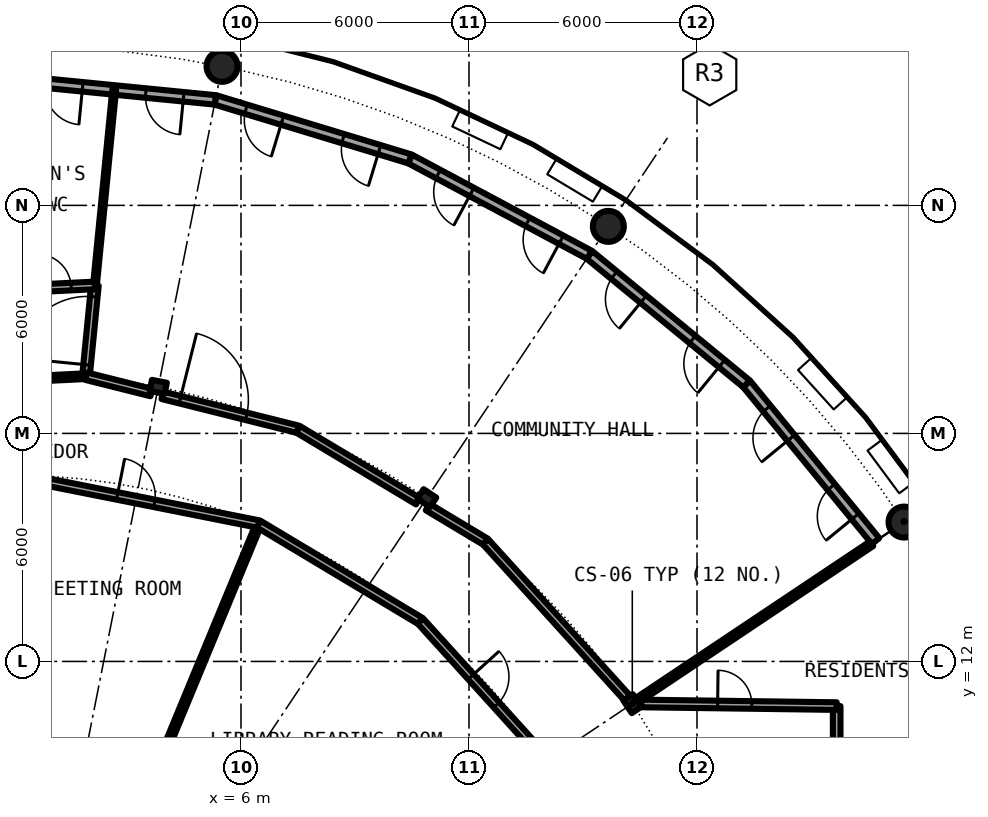
"""IFC4 building model, lengths in metres.
Left out: names, types, materials, properties, quantities, classifications, styles, units other than length and angle.
Written with IfcOpenShell. Run it as: python <this file> out.ifc"""

import sys

from ifc_helpers import new_model, si_unit, direction, frame, frame_2d, origin, origin_2d, place, context, subcontext, project, spatial, rectangle, hollow_circle, i_section, extrude, element, fill, save


model = new_model("IFC4")
c1 = context("Model", 3, precision=1e-05, world=origin(), true_north=direction((0.0, 1.0)))
c2 = subcontext(c1, "Body", "Model", "MODEL_VIEW")
j1 = project(units=[si_unit("LENGTHUNIT", "METRE"), si_unit("PLANEANGLEUNIT", "RADIAN")], contexts=[c1])
p1 = place(None, origin())
s1 = spatial("IfcSite", under=j1, at=p1, CompositionType="ELEMENT")
p2 = place(p1, origin())
s2 = spatial("IfcBuilding", under=s1, at=p2, CompositionType="ELEMENT")
p3 = place(p2, frame((0.0, 0.0, 208.5)))
s3 = spatial("IfcBuildingStorey", under=s2, at=p3, CompositionType="ELEMENT", Elevation=208.5)
for number, where, z_axis, x_axis in (
    (1, (23.448, 15.667, 0.0), (0.0, 0.0, 1.0), (1.0, 0.0, 0.0)),
    (2, (15.667, 23.448, 0.0), (0.0, 0.0, 1.0), (1.0, 0.0, 0.0)),
    (3, (5.501, 27.658, 0.0), (0.0, 0.0, 1.0), (1.0, 0.0, 0.0)),
):
    element("IfcColumn", number, at=place(p3, frame(where, z_axis=z_axis, x_axis=x_axis)), inside=s3, PredefinedType="COLUMN", context=c2, shape_type="SweptSolid", body=[
        extrude(hollow_circle(Radius=0.406, WallThickness=0.03, at=origin_2d()), origin(), (0.0, 0.0, 1.0), 4.2),
    ])
for number, where, z_axis, x_axis in (
    (4, (16.297, 10.889, 0.0), (0.0, 0.0, 1.0), (0.831, 0.556, 0.0)),
    (5, (10.889, 16.297, 0.0), (0.0, 0.0, 1.0), (0.556, 0.831, 0.0)),
    (6, (3.824, 19.223, 0.0), (0.0, 0.0, 1.0), (0.195, 0.981, 0.0)),
):
    element("IfcColumn", number, at=place(p3, frame(where, z_axis=z_axis, x_axis=x_axis)), inside=s3, PredefinedType="COLUMN", context=c2, shape_type="SweptSolid", body=[
        extrude(i_section(OverallWidth=0.3, OverallDepth=0.4, WebThickness=0.013, FlangeThickness=0.024, FilletRadius=0.027, at=origin_2d()), origin(), (0.0, 0.0, 1.0), 4.2),
    ])
p4 = place(p3, frame((22.699, 15.167, 0.0), z_axis=(0.0, 0.0, 1.0), x_axis=(-0.634382322723, 0.773019449054, 0.0)))
e7 = element("IfcWall", 7, at=p4, inside=s3, PredefinedType="SOLIDWALL", context=c2, shape_type="SweptSolid", body=[
    extrude(rectangle(XDim=5.352, YDim=0.25, at=frame_2d((2.676, 0.0))), origin(), (0.0, 0.0, 1.0), 3.85),
])
p5 = place(p4, frame((0.841, 0.0, 0.0)))
e8 = element("IfcOpeningElement", 8, at=p5, cuts=e7, PredefinedType="OPENING", context=c2, shape_type="SweptSolid", body=[
    extrude(rectangle(XDim=1.0, YDim=2.2, at=frame_2d((0.5, 1.1))), frame((0.0, 0.135, 0.0), z_axis=(0.0, -1.0, 0.0), x_axis=(1.0, 0.0, 0.0)), (0.0, 0.0, 1.0), 0.27),
])
p6 = place(p4, frame((3.51, 0.0, 0.0)))
e9 = element("IfcOpeningElement", 9, at=p6, cuts=e7, PredefinedType="OPENING", context=c2, shape_type="SweptSolid", body=[
    extrude(rectangle(XDim=1.0, YDim=2.2, at=frame_2d((0.5, 1.1))), frame((0.0, 0.135, 0.0), z_axis=(0.0, -1.0, 0.0), x_axis=(1.0, 0.0, 0.0)), (0.0, 0.0, 1.0), 0.27),
])
p7 = place(p3, frame((19.304, 19.304, 0.0), z_axis=(0.0, 0.0, 1.0), x_axis=(-0.773019449054, 0.634382322723, 0.0)))
e10 = element("IfcWall", 10, at=p7, inside=s3, PredefinedType="SOLIDWALL", context=c2, shape_type="SweptSolid", body=[
    extrude(rectangle(XDim=5.352, YDim=0.25, at=frame_2d((2.676, 0.0))), origin(), (0.0, 0.0, 1.0), 3.85),
])
p8 = place(p7, frame((0.841, 0.0, 0.0)))
e11 = element("IfcOpeningElement", 11, at=p8, cuts=e10, PredefinedType="OPENING", context=c2, shape_type="SweptSolid", body=[
    extrude(rectangle(XDim=1.0, YDim=2.2, at=frame_2d((0.5, 1.1))), frame((0.0, 0.135, 0.0), z_axis=(0.0, -1.0, 0.0), x_axis=(1.0, 0.0, 0.0)), (0.0, 0.0, 1.0), 0.27),
])
p9 = place(p7, frame((3.51, 0.0, 0.0)))
e12 = element("IfcOpeningElement", 12, at=p9, cuts=e10, PredefinedType="OPENING", context=c2, shape_type="SweptSolid", body=[
    extrude(rectangle(XDim=1.0, YDim=2.2, at=frame_2d((0.5, 1.1))), frame((0.0, 0.135, 0.0), z_axis=(0.0, -1.0, 0.0), x_axis=(1.0, 0.0, 0.0)), (0.0, 0.0, 1.0), 0.27),
])
p10 = place(p3, frame((15.167, 22.699, 0.0), z_axis=(0.0, 0.0, 1.0), x_axis=(-0.881915646801, 0.471407246368, 0.0)))
e13 = element("IfcWall", 13, at=p10, inside=s3, PredefinedType="SOLIDWALL", context=c2, shape_type="SweptSolid", body=[
    extrude(rectangle(XDim=5.352, YDim=0.25, at=frame_2d((2.676, 0.0))), origin(), (0.0, 0.0, 1.0), 3.85),
])
p11 = place(p10, frame((0.841, 0.0, 0.0)))
e14 = element("IfcOpeningElement", 14, at=p11, cuts=e13, PredefinedType="OPENING", context=c2, shape_type="SweptSolid", body=[
    extrude(rectangle(XDim=1.0, YDim=2.2, at=frame_2d((0.5, 1.1))), frame((0.0, 0.135, 0.0), z_axis=(0.0, -1.0, 0.0), x_axis=(1.0, 0.0, 0.0)), (0.0, 0.0, 1.0), 0.27),
])
p12 = place(p10, frame((3.51, 0.0, 0.0)))
e15 = element("IfcOpeningElement", 15, at=p12, cuts=e13, PredefinedType="OPENING", context=c2, shape_type="SweptSolid", body=[
    extrude(rectangle(XDim=1.0, YDim=2.2, at=frame_2d((0.5, 1.1))), frame((0.0, 0.135, 0.0), z_axis=(0.0, -1.0, 0.0), x_axis=(1.0, 0.0, 0.0)), (0.0, 0.0, 1.0), 0.27),
])
p13 = place(p3, frame((10.447, 25.222, 0.0), z_axis=(0.0, 0.0, 1.0), x_axis=(-0.956965678721, 0.290201119486, 0.0)))
e16 = element("IfcWall", 16, at=p13, inside=s3, PredefinedType="SOLIDWALL", context=c2, shape_type="SweptSolid", body=[
    extrude(rectangle(XDim=5.351, YDim=0.25, at=frame_2d((2.676, 0.0))), origin(), (0.0, 0.0, 1.0), 3.85),
])
p14 = place(p13, frame((0.841, 0.0, 0.0)))
e17 = element("IfcOpeningElement", 17, at=p14, cuts=e16, PredefinedType="OPENING", context=c2, shape_type="SweptSolid", body=[
    extrude(rectangle(XDim=1.0, YDim=2.2, at=frame_2d((0.5, 1.1))), frame((0.0, 0.135, 0.0), z_axis=(0.0, -1.0, 0.0), x_axis=(1.0, 0.0, 0.0)), (0.0, 0.0, 1.0), 0.27),
])
p15 = place(p13, frame((3.51, 0.0, 0.0)))
e18 = element("IfcOpeningElement", 18, at=p15, cuts=e16, PredefinedType="OPENING", context=c2, shape_type="SweptSolid", body=[
    extrude(rectangle(XDim=1.0, YDim=2.2, at=frame_2d((0.5, 1.1))), frame((0.0, 0.135, 0.0), z_axis=(0.0, -1.0, 0.0), x_axis=(1.0, 0.0, 0.0)), (0.0, 0.0, 1.0), 0.27),
])
p16 = place(p3, frame((5.326, 26.775, 0.0), z_axis=(0.0, 0.0, 1.0), x_axis=(-0.995173996315, 0.098126026407, 0.0)))
e19 = element("IfcWall", 19, at=p16, inside=s3, PredefinedType="SOLIDWALL", context=c2, shape_type="SweptSolid", body=[
    extrude(rectangle(XDim=5.352, YDim=0.25, at=frame_2d((2.676, 0.0))), origin(), (0.0, 0.0, 1.0), 3.85),
])
p17 = place(p16, frame((0.841, 0.0, 0.0)))
e20 = element("IfcOpeningElement", 20, at=p17, cuts=e19, PredefinedType="OPENING", context=c2, shape_type="SweptSolid", body=[
    extrude(rectangle(XDim=1.0, YDim=2.2, at=frame_2d((0.5, 1.1))), frame((0.0, 0.135, 0.0), z_axis=(0.0, -1.0, 0.0), x_axis=(1.0, 0.0, 0.0)), (0.0, 0.0, 1.0), 0.27),
])
p18 = place(p16, frame((3.51, 0.0, 0.0)))
e21 = element("IfcOpeningElement", 21, at=p18, cuts=e19, PredefinedType="OPENING", context=c2, shape_type="SweptSolid", body=[
    extrude(rectangle(XDim=1.0, YDim=2.2, at=frame_2d((0.5, 1.1))), frame((0.0, 0.135, 0.0), z_axis=(0.0, -1.0, 0.0), x_axis=(1.0, 0.0, 0.0)), (0.0, 0.0, 1.0), 0.27),
])
p19 = place(p3, frame((21.675, 9.05, 0.0), z_axis=(0.0, 0.0, 1.0), x_axis=(0.0, 1.0, 0.0)))
e22 = element("IfcWall", 22, at=p19, inside=s3, PredefinedType="PARTITIONING", context=c2, shape_type="SweptSolid", body=[
    extrude(rectangle(XDim=1.775, YDim=0.2, at=frame_2d((0.887, 0.0))), origin(), (0.0, 0.0, 1.0), 3.85),
])
p20 = place(p3, frame((1.921, 19.506, 0.0), z_axis=(0.0, 0.0, 1.0), x_axis=(0.097982433599, 0.995188144376, 0.0)))
e23 = element("IfcWall", 23, at=p20, inside=s3, PredefinedType="PARTITIONING", context=c2, shape_type="SweptSolid", body=[
    extrude(rectangle(XDim=2.399, YDim=0.2, at=frame_2d((1.2, 0.0))), origin(), (0.0, 0.0, 1.0), 3.85),
])
p21 = place(p20, frame((0.3, 0.0, 0.0)))
e24 = element("IfcOpeningElement", 24, at=p21, cuts=e23, PredefinedType="OPENING", context=c2, shape_type="SweptSolid", body=[
    extrude(rectangle(XDim=1.8, YDim=2.3, at=frame_2d((0.9, 1.15))), frame((0.0, 0.11, 0.0), z_axis=(0.0, -1.0, 0.0), x_axis=(1.0, 0.0, 0.0)), (0.0, 0.0, 1.0), 0.22),
])
p22 = place(p3, frame((2.156, 21.894, 0.0), z_axis=(0.0, 0.0, 1.0), x_axis=(0.098177046306, 0.995168964336, 0.0)))
e25 = element("IfcWall", 25, at=p22, inside=s3, PredefinedType="PARTITIONING", context=c2, shape_type="SweptSolid", body=[
    extrude(rectangle(XDim=5.175, YDim=0.1, at=frame_2d((2.587, 0.0))), origin(), (0.0, 0.0, 1.0), 3.85),
])
p23 = place(p3, frame((2.954, 7.132, 0.0), z_axis=(0.0, 0.0, 1.0), x_axis=(0.382646942224, 0.923894646378, 0.0)))
e26 = element("IfcWall", 26, at=p23, inside=s3, PredefinedType="PARTITIONING", context=c2, shape_type="SweptSolid", body=[
    extrude(rectangle(XDim=9.181, YDim=0.15, at=frame_2d((4.59, 0.0))), origin(), (0.0, 0.0, 1.0), 3.85),
])
p24 = place(p3, frame((16.463, 11.0, 0.0), z_axis=(0.0, 0.0, 1.0), x_axis=(0.831433566583, 0.555624175463, 0.0)))
e27 = element("IfcWall", 27, at=p24, inside=s3, PredefinedType="PARTITIONING", context=c2, shape_type="SweptSolid", body=[
    extrude(rectangle(XDim=7.375, YDim=0.15, at=frame_2d((3.688, 0.0))), origin(), (0.0, 0.0, 1.0), 3.85),
])
p25 = place(p3, frame((16.534, 10.894, 0.0), z_axis=(0.0, 0.0, 1.0), x_axis=(0.999909707888, -0.013437859594, 0.0)))
e28 = element("IfcWall", 28, at=p25, inside=s3, PredefinedType="PARTITIONING", context=c2, shape_type="SweptSolid", body=[
    extrude(rectangle(XDim=5.142, YDim=0.2, at=frame_2d((2.571, 0.0))), origin(), (0.0, 0.0, 1.0), 3.85),
])
p26 = place(p25, frame((2.008, 0.0, 0.0)))
e29 = element("IfcOpeningElement", 29, at=p26, cuts=e28, PredefinedType="OPENING", context=c2, shape_type="SweptSolid", body=[
    extrude(rectangle(XDim=0.9, YDim=2.3, at=frame_2d((0.45, 1.15))), frame((0.0, 0.11, 0.0), z_axis=(0.0, -1.0, 0.0), x_axis=(1.0, 0.0, 0.0)), (0.0, 0.0, 1.0), 0.22),
])
p27 = place(p3, frame((0.0, 16.9, 0.0), z_axis=(0.0, 0.0, 1.0), x_axis=(0.980799374359, -0.195019453537, 0.0)))
e30 = element("IfcWall", 30, at=p27, inside=s3, PredefinedType="PARTITIONING", context=c2, shape_type="SweptSolid", body=[
    extrude(rectangle(XDim=6.594, YDim=0.2, at=frame_2d((3.297, 0.0))), origin(), (0.0, 0.0, 1.0), 3.85),
])
p28 = place(p27, frame((2.797, 0.0, 0.0)))
e31 = element("IfcOpeningElement", 31, at=p28, cuts=e30, PredefinedType="OPENING", context=c2, shape_type="SweptSolid", body=[
    extrude(rectangle(XDim=1.0, YDim=2.3, at=frame_2d((0.5, 1.15))), frame((0.0, 0.11, 0.0), z_axis=(0.0, -1.0, 0.0), x_axis=(1.0, 0.0, 0.0)), (0.0, 0.0, 1.0), 0.22),
])
p29 = place(p3, frame((6.467, 15.614, 0.0), z_axis=(0.0, 0.0, 1.0), x_axis=(0.857696997328, -0.514155483074, 0.0)))
e32 = element("IfcWall", 32, at=p29, inside=s3, PredefinedType="PARTITIONING", context=c2, shape_type="SweptSolid", body=[
    extrude(rectangle(XDim=4.96, YDim=0.2, at=frame_2d((2.48, 0.0))), origin(), (0.0, 0.0, 1.0), 3.85),
])
p30 = place(p3, frame((10.721, 13.064, 0.0), z_axis=(0.0, 0.0, 1.0), x_axis=(0.671634030197, -0.740883074095, 0.0)))
e33 = element("IfcWall", 33, at=p30, inside=s3, PredefinedType="PARTITIONING", context=c2, shape_type="SweptSolid", body=[
    extrude(rectangle(XDim=5.08, YDim=0.2, at=frame_2d((2.54, 0.0))), origin(), (0.0, 0.0, 1.0), 3.85),
])
p31 = place(p30, frame((1.98, 0.0, 0.0)))
e34 = element("IfcOpeningElement", 34, at=p31, cuts=e33, PredefinedType="OPENING", context=c2, shape_type="SweptSolid", body=[
    extrude(rectangle(XDim=1.0, YDim=2.3, at=frame_2d((0.5, 1.15))), frame((0.0, 0.11, 0.0), z_axis=(0.0, -1.0, 0.0), x_axis=(1.0, 0.0, 0.0)), (0.0, 0.0, 1.0), 0.22),
])
p32 = place(p3, frame((-3.672, 19.23, 0.0), z_axis=(0.0, 0.0, 1.0), x_axis=(0.998783562084, 0.049309188909, 0.0)))
e35 = element("IfcWall", 35, at=p32, inside=s3, PredefinedType="PARTITIONING", context=c2, shape_type="SweptSolid", body=[
    extrude(rectangle(XDim=5.6, YDim=0.15, at=frame_2d((2.8, 0.0))), origin(), (0.0, 0.0, 1.0), 3.6),
])
p33 = place(p32, frame((2.224, 0.0, 0.0)))
e36 = element("IfcOpeningElement", 36, at=p33, cuts=e35, PredefinedType="OPENING", context=c2, shape_type="SweptSolid", body=[
    extrude(rectangle(XDim=1.0, YDim=2.3, at=frame_2d((0.5, 1.15))), frame((0.0, 0.085, 0.0), z_axis=(0.0, -1.0, 0.0), x_axis=(1.0, 0.0, 0.0)), (0.0, 0.0, 1.0), 0.17),
])
p34 = place(p3, frame((1.921, 19.506, 0.0), z_axis=(0.0, 0.0, 1.0), x_axis=(0.969996560647, -0.243118638391, 0.0)))
e37 = element("IfcWall", 37, at=p34, inside=s3, PredefinedType="PARTITIONING", context=c2, shape_type="SweptSolid", body=[
    extrude(rectangle(XDim=1.773, YDim=0.2, at=frame_2d((0.887, 0.0))), origin(), (0.0, 0.0, 1.0), 3.6),
])
p35 = place(p3, frame((3.933, 19.002, 0.0), z_axis=(0.0, 0.0, 1.0), x_axis=(0.970009604092, -0.243066591637, 0.0)))
e38 = element("IfcWall", 38, at=p35, inside=s3, PredefinedType="PARTITIONING", context=c2, shape_type="SweptSolid", body=[
    extrude(rectangle(XDim=3.678, YDim=0.2, at=frame_2d((1.839, 0.0))), origin(), (0.0, 0.0, 1.0), 3.6),
])
p36 = place(p35, frame((0.476, 0.0, 0.0)))
e39 = element("IfcOpeningElement", 39, at=p36, cuts=e38, PredefinedType="OPENING", context=c2, shape_type="SweptSolid", body=[
    extrude(rectangle(XDim=1.8, YDim=2.3, at=frame_2d((0.9, 1.15))), frame((0.0, 0.11, 0.0), z_axis=(0.0, -1.0, 0.0), x_axis=(1.0, 0.0, 0.0)), (0.0, 0.0, 1.0), 0.22),
])
p37 = place(p3, frame((7.501, 18.108, 0.0), z_axis=(0.0, 0.0, 1.0), x_axis=(0.857750505244, -0.514066212421, 0.0)))
e40 = element("IfcWall", 40, at=p37, inside=s3, PredefinedType="PARTITIONING", context=c2, shape_type="SweptSolid", body=[
    extrude(rectangle(XDim=3.678, YDim=0.2, at=frame_2d((1.839, 0.0))), origin(), (0.0, 0.0, 1.0), 3.6),
])
p38 = place(p3, frame((10.913, 16.063, 0.0), z_axis=(0.0, 0.0, 1.0), x_axis=(0.857614365469, -0.514293301668, 0.0)))
e41 = element("IfcWall", 41, at=p38, inside=s3, PredefinedType="PARTITIONING", context=c2, shape_type="SweptSolid", body=[
    extrude(rectangle(XDim=1.773, YDim=0.2, at=frame_2d((0.887, 0.0))), origin(), (0.0, 0.0, 1.0), 3.6),
])
p39 = place(p3, frame((12.434, 15.151, 0.0), z_axis=(0.0, 0.0, 1.0), x_axis=(0.671619657805, -0.740896102871, 0.0)))
e42 = element("IfcWall", 42, at=p39, inside=s3, PredefinedType="PARTITIONING", context=c2, shape_type="SweptSolid", body=[
    extrude(rectangle(XDim=5.6, YDim=0.2, at=frame_2d((2.8, 0.0))), origin(), (0.0, 0.0, 1.0), 3.6),
])
p40 = place(p3, frame((0.007, 21.788, 0.0), z_axis=(0.0, 0.0, 1.0), x_axis=(0.998786623078, 0.049247147741, 0.0)))
e43 = element("IfcWall", 43, at=p40, inside=s3, PredefinedType="PARTITIONING", context=c2, shape_type="SweptSolid", body=[
    extrude(rectangle(XDim=2.152, YDim=0.2, at=frame_2d((1.076, 0.0))), origin(), (0.0, 0.0, 1.0), 3.85),
])
p41 = place(p40, frame((0.626, 0.0, 0.0)))
e44 = element("IfcOpeningElement", 44, at=p41, cuts=e43, PredefinedType="OPENING", context=c2, shape_type="SweptSolid", body=[
    extrude(rectangle(XDim=0.9, YDim=2.3, at=frame_2d((0.45, 1.15))), frame((0.0, 0.11, 0.0), z_axis=(0.0, -1.0, 0.0), x_axis=(1.0, 0.0, 0.0)), (0.0, 0.0, 1.0), 0.22),
])
p42 = place(p5, origin())
e45 = element("IfcDoor", 45, at=p42, inside=s3, OperationType="SINGLE_SWING_LEFT", PredefinedType="DOOR", context=c2, shape_type="SweptSolid", body=[
    extrude(rectangle(XDim=1.0, YDim=2.2, at=frame_2d((0.5, 1.1))), frame((0.0, 0.025, 0.0), z_axis=(0.0, -1.0, 0.0), x_axis=(1.0, 0.0, 0.0)), (0.0, 0.0, 1.0), 0.05),
])
fill(e8, e45)
p43 = place(p6, origin())
e46 = element("IfcDoor", 46, at=p43, inside=s3, OperationType="SINGLE_SWING_LEFT", PredefinedType="DOOR", context=c2, shape_type="SweptSolid", body=[
    extrude(rectangle(XDim=1.0, YDim=2.2, at=frame_2d((0.5, 1.1))), frame((0.0, 0.025, 0.0), z_axis=(0.0, -1.0, 0.0), x_axis=(1.0, 0.0, 0.0)), (0.0, 0.0, 1.0), 0.05),
])
fill(e9, e46)
p44 = place(p8, origin())
e47 = element("IfcDoor", 47, at=p44, inside=s3, OperationType="SINGLE_SWING_LEFT", PredefinedType="DOOR", context=c2, shape_type="SweptSolid", body=[
    extrude(rectangle(XDim=1.0, YDim=2.2, at=frame_2d((0.5, 1.1))), frame((0.0, 0.025, 0.0), z_axis=(0.0, -1.0, 0.0), x_axis=(1.0, 0.0, 0.0)), (0.0, 0.0, 1.0), 0.05),
])
fill(e11, e47)
p45 = place(p9, origin())
e48 = element("IfcDoor", 48, at=p45, inside=s3, OperationType="SINGLE_SWING_LEFT", PredefinedType="DOOR", context=c2, shape_type="SweptSolid", body=[
    extrude(rectangle(XDim=1.0, YDim=2.2, at=frame_2d((0.5, 1.1))), frame((0.0, 0.025, 0.0), z_axis=(0.0, -1.0, 0.0), x_axis=(1.0, 0.0, 0.0)), (0.0, 0.0, 1.0), 0.05),
])
fill(e12, e48)
p46 = place(p11, origin())
e49 = element("IfcDoor", 49, at=p46, inside=s3, OperationType="SINGLE_SWING_LEFT", PredefinedType="DOOR", context=c2, shape_type="SweptSolid", body=[
    extrude(rectangle(XDim=1.0, YDim=2.2, at=frame_2d((0.5, 1.1))), frame((0.0, 0.025, 0.0), z_axis=(0.0, -1.0, 0.0), x_axis=(1.0, 0.0, 0.0)), (0.0, 0.0, 1.0), 0.05),
])
fill(e14, e49)
p47 = place(p12, origin())
e50 = element("IfcDoor", 50, at=p47, inside=s3, OperationType="SINGLE_SWING_LEFT", PredefinedType="DOOR", context=c2, shape_type="SweptSolid", body=[
    extrude(rectangle(XDim=1.0, YDim=2.2, at=frame_2d((0.5, 1.1))), frame((0.0, 0.025, 0.0), z_axis=(0.0, -1.0, 0.0), x_axis=(1.0, 0.0, 0.0)), (0.0, 0.0, 1.0), 0.05),
])
fill(e15, e50)
p48 = place(p14, origin())
e51 = element("IfcDoor", 51, at=p48, inside=s3, OperationType="SINGLE_SWING_LEFT", PredefinedType="DOOR", context=c2, shape_type="SweptSolid", body=[
    extrude(rectangle(XDim=1.0, YDim=2.2, at=frame_2d((0.5, 1.1))), frame((0.0, 0.025, 0.0), z_axis=(0.0, -1.0, 0.0), x_axis=(1.0, 0.0, 0.0)), (0.0, 0.0, 1.0), 0.05),
])
fill(e17, e51)
p49 = place(p15, origin())
e52 = element("IfcDoor", 52, at=p49, inside=s3, OperationType="SINGLE_SWING_LEFT", PredefinedType="DOOR", context=c2, shape_type="SweptSolid", body=[
    extrude(rectangle(XDim=1.0, YDim=2.2, at=frame_2d((0.5, 1.1))), frame((0.0, 0.025, 0.0), z_axis=(0.0, -1.0, 0.0), x_axis=(1.0, 0.0, 0.0)), (0.0, 0.0, 1.0), 0.05),
])
fill(e18, e52)
p50 = place(p17, origin())
e53 = element("IfcDoor", 53, at=p50, inside=s3, OperationType="SINGLE_SWING_LEFT", PredefinedType="DOOR", context=c2, shape_type="SweptSolid", body=[
    extrude(rectangle(XDim=1.0, YDim=2.2, at=frame_2d((0.5, 1.1))), frame((0.0, 0.025, 0.0), z_axis=(0.0, -1.0, 0.0), x_axis=(1.0, 0.0, 0.0)), (0.0, 0.0, 1.0), 0.05),
])
fill(e20, e53)
p51 = place(p18, origin())
e54 = element("IfcDoor", 54, at=p51, inside=s3, OperationType="SINGLE_SWING_LEFT", PredefinedType="DOOR", context=c2, shape_type="SweptSolid", body=[
    extrude(rectangle(XDim=1.0, YDim=2.2, at=frame_2d((0.5, 1.1))), frame((0.0, 0.025, 0.0), z_axis=(0.0, -1.0, 0.0), x_axis=(1.0, 0.0, 0.0)), (0.0, 0.0, 1.0), 0.05),
])
fill(e21, e54)
p52 = place(p41, origin())
e55 = element("IfcDoor", 55, at=p52, inside=s3, OperationType="SINGLE_SWING_LEFT", PredefinedType="DOOR", context=c2, shape_type="SweptSolid", body=[
    extrude(rectangle(XDim=0.9, YDim=2.3, at=frame_2d((0.45, 1.15))), frame((0.0, 0.025, 0.0), z_axis=(0.0, -1.0, 0.0), x_axis=(1.0, 0.0, 0.0)), (0.0, 0.0, 1.0), 0.05),
])
fill(e44, e55)
p53 = place(p36, origin())
e56 = element("IfcDoor", 56, at=p53, inside=s3, OperationType="DOUBLE_DOOR_SINGLE_SWING", PredefinedType="DOOR", context=c2, shape_type="SweptSolid", body=[
    extrude(rectangle(XDim=1.8, YDim=2.3, at=frame_2d((0.9, 1.15))), frame((0.0, 0.025, 0.0), z_axis=(0.0, -1.0, 0.0), x_axis=(1.0, 0.0, 0.0)), (0.0, 0.0, 1.0), 0.05),
])
fill(e39, e56)
p54 = place(p21, origin())
e57 = element("IfcDoor", 57, at=p54, inside=s3, OperationType="DOUBLE_DOOR_SINGLE_SWING", PredefinedType="DOOR", context=c2, shape_type="SweptSolid", body=[
    extrude(rectangle(XDim=1.8, YDim=2.3, at=frame_2d((0.9, 1.15))), frame((0.0, 0.025, 0.0), z_axis=(0.0, -1.0, 0.0), x_axis=(1.0, 0.0, 0.0)), (0.0, 0.0, 1.0), 0.05),
])
fill(e24, e57)
p55 = place(p31, origin())
e58 = element("IfcDoor", 58, at=p55, inside=s3, OperationType="SINGLE_SWING_RIGHT", PredefinedType="DOOR", context=c2, shape_type="SweptSolid", body=[
    extrude(rectangle(XDim=1.0, YDim=2.3, at=frame_2d((0.5, 1.15))), frame((0.0, 0.025, 0.0), z_axis=(0.0, -1.0, 0.0), x_axis=(1.0, 0.0, 0.0)), (0.0, 0.0, 1.0), 0.05),
])
fill(e34, e58)
p56 = place(p28, origin())
e59 = element("IfcDoor", 59, at=p56, inside=s3, OperationType="SINGLE_SWING_LEFT", PredefinedType="DOOR", context=c2, shape_type="SweptSolid", body=[
    extrude(rectangle(XDim=1.0, YDim=2.3, at=frame_2d((0.5, 1.15))), frame((0.0, 0.025, 0.0), z_axis=(0.0, -1.0, 0.0), x_axis=(1.0, 0.0, 0.0)), (0.0, 0.0, 1.0), 0.05),
])
fill(e31, e59)
p57 = place(p26, origin())
e60 = element("IfcDoor", 60, at=p57, inside=s3, OperationType="SINGLE_SWING_LEFT", PredefinedType="DOOR", context=c2, shape_type="SweptSolid", body=[
    extrude(rectangle(XDim=0.9, YDim=2.3, at=frame_2d((0.45, 1.15))), frame((0.0, 0.025, 0.0), z_axis=(0.0, -1.0, 0.0), x_axis=(1.0, 0.0, 0.0)), (0.0, 0.0, 1.0), 0.05),
])
fill(e29, e60)
save(model, sys.argv[1])
